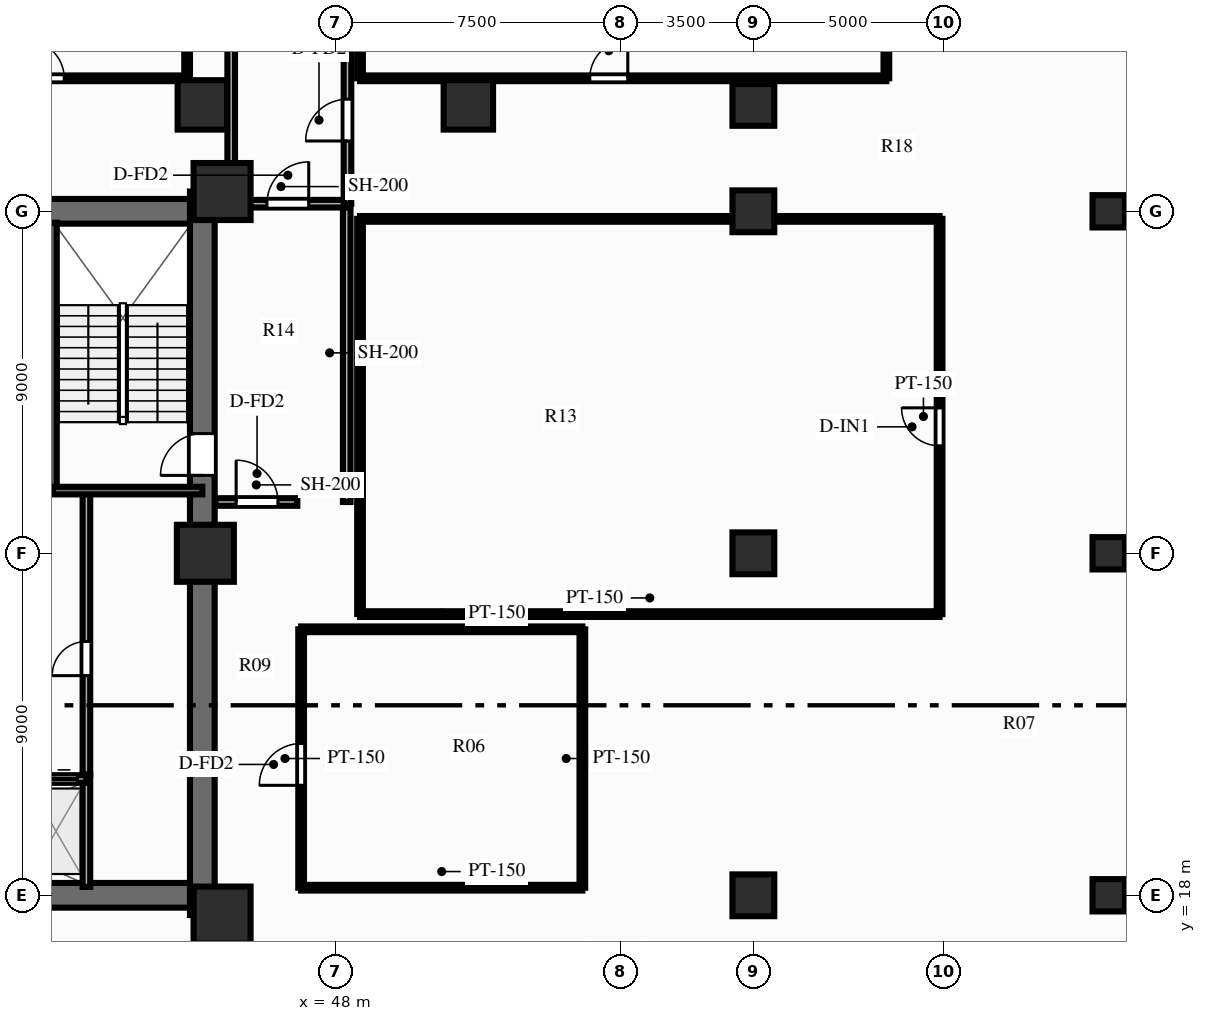
"""IFC4 building model, lengths in metres.
Left out: names, types, materials, properties, quantities, classifications, styles, units other than length and angle.
Written with IfcOpenShell. Run it as: python <this file> out.ifc"""

import sys

from ifc_helpers import new_model, si_unit, direction, frame, frame_2d, origin, origin_2d, place, context, subcontext, project, spatial, rectangle, circle, extrude, source, transform, mapped, element, fill, save


model = new_model("IFC4")
c1 = context("Model", 3, precision=1e-05, world=origin(), true_north=direction((0.0, 1.0)))
c2 = subcontext(c1, "Body", "Model", "MODEL_VIEW")
j1 = project(units=[si_unit("LENGTHUNIT", "METRE"), si_unit("PLANEANGLEUNIT", "RADIAN")], contexts=[c1])
p1 = place(None, origin())
s1 = spatial("IfcSite", under=j1, at=p1, CompositionType="ELEMENT")
p2 = place(p1, origin())
s2 = spatial("IfcBuilding", under=s1, at=p2, CompositionType="ELEMENT")
p3 = place(p2, origin())
s3 = spatial("IfcBuildingStorey", under=s2, at=p3, CompositionType="ELEMENT", Elevation=0.0)
p4 = place(p3, frame((44.5, 17.48, 0.0), z_axis=(0.0, 0.0, 1.0), x_axis=(0.0, 1.0, 0.0)))
e1 = element("IfcWall", 1, at=p4, inside=s3, PredefinedType="SHEAR", context=c2, shape_type="SweptSolid", body=[
    extrude(rectangle(XDim=19.04, YDim=0.65, at=frame_2d((9.52, 0.0))), origin(), (0.0, 0.0, 1.0), 4.2),
])
p5 = place(p4, frame((12.67, 0.0, 0.0), z_axis=(0.0, 0.0, 1.0), x_axis=(-1.0, 0.0, 0.0)))
e2 = element("IfcOpeningElement", 2, at=p5, cuts=e1, PredefinedType="OPENING", context=c2, shape_type="SweptSolid", body=[
    extrude(rectangle(XDim=1.1, YDim=2.15, at=frame_2d((0.55, 1.075))), frame((0.0, 0.337, 0.0), z_axis=(0.0, -1.0, 0.0), x_axis=(1.0, 0.0, 0.0)), (0.0, 0.0, 1.0), 0.674),
])
p6 = place(p3, frame((31.825, 18.0, 0.0), z_axis=(0.0, 0.0, 1.0), x_axis=(1.0, 0.0, 0.0)))
e3 = element("IfcWall", 3, at=p6, inside=s3, PredefinedType="SHEAR", context=c2, shape_type="SweptSolid", body=[
    extrude(rectangle(XDim=12.35, YDim=0.65, at=frame_2d((6.175, 0.0))), origin(), (0.0, 0.0, 1.0), 4.2),
])
p7 = place(p3, frame((31.825, 36.0, 0.0), z_axis=(0.0, 0.0, 1.0), x_axis=(1.0, 0.0, 0.0)))
e4 = element("IfcWall", 4, at=p7, inside=s3, PredefinedType="SHEAR", context=c2, shape_type="SweptSolid", body=[
    extrude(rectangle(XDim=12.35, YDim=0.65, at=frame_2d((6.175, 0.0))), origin(), (0.0, 0.0, 1.0), 4.2),
])
p8 = place(p7, frame((5.125, 0.0, 0.0), z_axis=(0.0, 0.0, 1.0), x_axis=(-1.0, 0.0, 0.0)))
e5 = element("IfcOpeningElement", 5, at=p8, cuts=e4, PredefinedType="OPENING", context=c2, shape_type="SweptSolid", body=[
    extrude(rectangle(XDim=1.4, YDim=2.15, at=frame_2d((0.7, 1.075))), frame((0.0, 0.337, 0.0), z_axis=(0.0, -1.0, 0.0), x_axis=(1.0, 0.0, 0.0)), (0.0, 0.0, 1.0), 0.674),
])
m1 = source(origin(), c2, "Body", "SweptSolid", [
    extrude(rectangle(XDim=1.5, YDim=1.5, at=origin_2d()), origin(), (0.0, 0.0, 1.0), 4.2),
])
for number, where, z_axis, x_axis in (
    (6, (45.02, 17.48, 0.0), (0.0, 0.0, 1.0), (1.0, 0.0, 0.0)),
    (7, (45.02, 36.52, 0.0), (0.0, 0.0, 1.0), (1.0, 0.0, 0.0)),
    (8, (44.58, 27.0, 0.0), (0.0, 0.0, 1.0), (1.0, 0.0, 0.0)),
):
    element("IfcColumn", number, at=place(p3, frame(where, z_axis=z_axis, x_axis=x_axis)), inside=s3, PredefinedType="COLUMN", context=c2, shape_type="MappedRepresentation", body=[
        mapped(m1, transform((0.0, 0.0, 0.0), scale=1.0)),
    ])
m2 = source(origin(), c2, "Body", "SweptSolid", [
    extrude(circle(Radius=0.425, at=origin_2d()), origin(), (0.0, 0.0, 1.0), 4.2),
])
for number, where, z_axis, x_axis in (
    (9, (68.35, 18.0, 0.0), (0.0, 0.0, 1.0), (1.0, 0.0, 0.0)),
    (10, (68.35, 27.0, 0.0), (0.0, 0.0, 1.0), (1.0, 0.0, 0.0)),
    (11, (68.35, 36.0, 0.0), (0.0, 0.0, 1.0), (1.0, 0.0, 0.0)),
):
    element("IfcColumn", number, at=place(p3, frame(where, z_axis=z_axis, x_axis=x_axis)), inside=s3, PredefinedType="COLUMN", context=c2, shape_type="MappedRepresentation", body=[
        mapped(m2, transform((0.0, 0.0, 0.0), scale=1.0)),
    ])
m3 = source(origin(), c2, "Body", "SweptSolid", [
    extrude(rectangle(XDim=1.1, YDim=1.1, at=origin_2d()), origin(), (0.0, 0.0, 1.0), 4.2),
])
for number, where, z_axis, x_axis in (
    (12, (59.0, 18.0, 0.0), (0.0, 0.0, 1.0), (1.0, 0.0, 0.0)),
    (13, (59.0, 27.0, 0.0), (0.0, 0.0, 1.0), (1.0, 0.0, 0.0)),
    (14, (59.0, 36.0, 0.0), (0.0, 0.0, 1.0), (1.0, 0.0, 0.0)),
    (15, (59.0, 38.8, 0.0), (0.0, 0.0, 1.0), (1.0, 0.0, 0.0)),
):
    element("IfcColumn", number, at=place(p3, frame(where, z_axis=z_axis, x_axis=x_axis)), inside=s3, PredefinedType="COLUMN", context=c2, shape_type="MappedRepresentation", body=[
        mapped(m3, transform((0.0, 0.0, 0.0), scale=1.0)),
    ])
m4 = source(origin(), c2, "Body", "SweptSolid", [
    extrude(rectangle(XDim=1.3, YDim=1.3, at=origin_2d()), origin(), (0.0, 0.0, 1.0), 4.2),
])
for number, where, z_axis, x_axis in (
    (16, (44.5, 38.8, 0.0), (0.0, 0.0, 1.0), (1.0, 0.0, 0.0)),
    (17, (51.5, 38.8, 0.0), (0.0, 0.0, 1.0), (1.0, 0.0, 0.0)),
):
    element("IfcColumn", number, at=place(p3, frame(where, z_axis=z_axis, x_axis=x_axis)), inside=s3, PredefinedType="COLUMN", context=c2, shape_type="MappedRepresentation", body=[
        mapped(m4, transform((0.0, 0.0, 0.0), scale=1.0)),
    ])
p9 = place(p3, frame((41.45, 18.22, 0.0), z_axis=(0.0, 0.0, 1.0), x_axis=(0.0, 1.0, 0.0)))
e18 = element("IfcWall", 18, at=p9, inside=s3, PredefinedType="PARTITIONING", context=c2, shape_type="SweptSolid", body=[
    extrude(rectangle(XDim=2.96, YDim=0.2, at=frame_2d((1.48, 0.0))), origin(), (0.0, 0.0, 1.0), 3.92),
])
p10 = place(p3, frame((41.45, 21.18, 0.0), z_axis=(0.0, 0.0, 1.0), x_axis=(0.0, 1.0, 0.0)))
e19 = element("IfcWall", 19, at=p10, inside=s3, PredefinedType="PARTITIONING", context=c2, shape_type="SweptSolid", body=[
    extrude(rectangle(XDim=7.42, YDim=0.2, at=frame_2d((3.71, 0.0))), origin(), (0.0, 0.0, 1.0), 3.92),
])
p11 = place(p10, frame((2.6, 0.0, 0.0)))
e20 = element("IfcOpeningElement", 20, at=p11, cuts=e19, PredefinedType="OPENING", context=c2, shape_type="SweptSolid", body=[
    extrude(rectangle(XDim=0.9, YDim=2.1, at=frame_2d((0.45, 1.05))), frame((0.0, 0.112, 0.0), z_axis=(0.0, -1.0, 0.0), x_axis=(1.0, 0.0, 0.0)), (0.0, 0.0, 1.0), 0.224),
])
p12 = place(p3, frame((35.43, 21.06, 0.0), z_axis=(0.0, 0.0, 1.0), x_axis=(1.0, 0.0, 0.0)))
e21 = element("IfcWall", 21, at=p12, inside=s3, PredefinedType="PARTITIONING", context=c2, shape_type="SweptSolid", body=[
    extrude(rectangle(XDim=6.02, YDim=0.2, at=frame_2d((3.01, 0.0))), origin(), (0.0, 0.0, 1.0), 3.92),
])
p13 = place(p12, frame((1.0, 0.0, 0.0)))
e22 = element("IfcOpeningElement", 22, at=p13, cuts=e21, PredefinedType="OPENING", context=c2, shape_type="SweptSolid", body=[
    extrude(rectangle(XDim=1.1, YDim=2.15, at=frame_2d((0.55, 1.075))), frame((0.0, 0.112, 0.0), z_axis=(0.0, -1.0, 0.0), x_axis=(1.0, 0.0, 0.0)), (0.0, 0.0, 1.0), 0.224),
])
p14 = place(p12, frame((2.95, 0.0, 0.0)))
e23 = element("IfcOpeningElement", 23, at=p14, cuts=e21, PredefinedType="OPENING", context=c2, shape_type="SweptSolid", body=[
    extrude(rectangle(XDim=1.1, YDim=2.15, at=frame_2d((0.55, 1.075))), frame((0.0, 0.112, 0.0), z_axis=(0.0, -1.0, 0.0), x_axis=(1.0, 0.0, 0.0)), (0.0, 0.0, 1.0), 0.224),
])
p15 = place(p12, frame((4.58, 0.0, 0.0)))
e24 = element("IfcOpeningElement", 24, at=p15, cuts=e21, PredefinedType="OPENING", context=c2, shape_type="SweptSolid", body=[
    extrude(rectangle(XDim=1.2, YDim=2.15, at=frame_2d((0.6, 1.075))), frame((0.0, 0.112, 0.0), z_axis=(0.0, -1.0, 0.0), x_axis=(1.0, 0.0, 0.0)), (0.0, 0.0, 1.0), 0.224),
])
p16 = place(p3, frame((40.57, 28.65, 0.0), z_axis=(0.0, 0.0, 1.0), x_axis=(0.0, 1.0, 0.0)))
e25 = element("IfcWall", 25, at=p16, inside=s3, PredefinedType="SOLIDWALL", context=c2, shape_type="SweptSolid", body=[
    extrude(rectangle(XDim=7.05, YDim=0.2, at=frame_2d((3.525, 0.0))), origin(), (0.0, 0.0, 1.0), 3.92),
])
p17 = place(p3, frame((40.57, 28.65, 0.0), z_axis=(0.0, 0.0, 1.0), x_axis=(1.0, 0.0, 0.0)))
e26 = element("IfcWall", 26, at=p17, inside=s3, PredefinedType="SOLIDWALL", context=c2, shape_type="SweptSolid", body=[
    extrude(rectangle(XDim=3.93, YDim=0.2, at=frame_2d((1.965, 0.0))), origin(), (0.0, 0.0, 1.0), 3.92),
])
p18 = place(p3, frame((44.84, 28.35, 0.0), z_axis=(0.0, 0.0, 1.0), x_axis=(1.0, 0.0, 0.0)))
e27 = element("IfcWall", 27, at=p18, inside=s3, PredefinedType="PARTITIONING", context=c2, shape_type="SweptSolid", body=[
    extrude(rectangle(XDim=2.16, YDim=0.2, at=frame_2d((1.08, 0.0))), origin(), (0.0, 0.0, 1.0), 3.92),
])
p19 = place(p18, frame((0.55, 0.0, 0.0)))
e28 = element("IfcOpeningElement", 28, at=p19, cuts=e27, PredefinedType="OPENING", context=c2, shape_type="SweptSolid", body=[
    extrude(rectangle(XDim=1.1, YDim=2.15, at=frame_2d((0.55, 1.075))), frame((0.0, 0.112, 0.0), z_axis=(0.0, -1.0, 0.0), x_axis=(1.0, 0.0, 0.0)), (0.0, 0.0, 1.0), 0.224),
])
p20 = place(p3, frame((48.3, 28.35, 0.0), z_axis=(0.0, 0.0, 1.0), x_axis=(0.0, 1.0, 0.0)))
e29 = element("IfcWall", 29, at=p20, inside=s3, PredefinedType="PARTITIONING", context=c2, shape_type="SweptSolid", body=[
    extrude(rectangle(XDim=7.85, YDim=0.2, at=frame_2d((3.925, 0.0))), origin(), (0.0, 0.0, 1.0), 3.92),
])
p21 = place(p3, frame((44.84, 36.2, 0.0), z_axis=(0.0, 0.0, 1.0), x_axis=(1.0, 0.0, 0.0)))
e30 = element("IfcWall", 30, at=p21, inside=s3, PredefinedType="PARTITIONING", context=c2, shape_type="SweptSolid", body=[
    extrude(rectangle(XDim=3.46, YDim=0.2, at=frame_2d((1.73, 0.0))), origin(), (0.0, 0.0, 1.0), 3.29),
])
p22 = place(p21, frame((1.36, 0.0, 0.0)))
e31 = element("IfcOpeningElement", 31, at=p22, cuts=e30, PredefinedType="OPENING", context=c2, shape_type="SweptSolid", body=[
    extrude(rectangle(XDim=1.1, YDim=2.15, at=frame_2d((0.55, 1.075))), frame((0.0, 0.112, 0.0), z_axis=(0.0, -1.0, 0.0), x_axis=(1.0, 0.0, 0.0)), (0.0, 0.0, 1.0), 0.224),
])
p23 = place(p3, frame((45.26, 36.2, 0.0), z_axis=(0.0, 0.0, 1.0), x_axis=(0.0, 1.0, 0.0)))
e32 = element("IfcWall", 32, at=p23, inside=s3, PredefinedType="PARTITIONING", context=c2, shape_type="SweptSolid", body=[
    extrude(rectangle(XDim=17.65, YDim=0.2, at=frame_2d((8.825, 0.0))), origin(), (0.0, 0.0, 1.0), 3.44),
])
p24 = place(p3, frame((48.32, 36.2, 0.0), z_axis=(0.0, 0.0, 1.0), x_axis=(0.0, 1.0, 0.0)))
e33 = element("IfcWall", 33, at=p24, inside=s3, PredefinedType="PARTITIONING", context=c2, shape_type="SweptSolid", body=[
    extrude(rectangle(XDim=17.65, YDim=0.2, at=frame_2d((8.825, 0.0))), origin(), (0.0, 0.0, 1.0), 3.92),
])
p25 = place(p24, frame((1.65, 0.0, 0.0)))
e34 = element("IfcOpeningElement", 34, at=p25, cuts=e33, PredefinedType="OPENING", context=c2, shape_type="SweptSolid", body=[
    extrude(rectangle(XDim=1.1, YDim=2.15, at=frame_2d((0.55, 1.075))), frame((0.0, 0.112, 0.0), z_axis=(0.0, -1.0, 0.0), x_axis=(1.0, 0.0, 0.0)), (0.0, 0.0, 1.0), 0.224),
])
for number, where, z_axis, x_axis in (
    (35, (47.1, 18.2, 0.0), (0.0, 0.0, 1.0), (1.0, 0.0, 0.0)),
    (36, (47.1, 25.0, 0.0), (0.0, 0.0, 1.0), (1.0, 0.0, 0.0)),
):
    element("IfcWall", number, at=place(p3, frame(where, z_axis=z_axis, x_axis=x_axis)), inside=s3, PredefinedType="PARTITIONING", context=c2, shape_type="SweptSolid", body=[
        extrude(rectangle(XDim=7.4, YDim=0.15, at=frame_2d((3.7, 0.0))), origin(), (0.0, 0.0, 1.0), 3.92),
    ])
p26 = place(p3, frame((47.1, 18.2, 0.0), z_axis=(0.0, 0.0, 1.0), x_axis=(0.0, 1.0, 0.0)))
e37 = element("IfcWall", 37, at=p26, inside=s3, PredefinedType="PARTITIONING", context=c2, shape_type="SweptSolid", body=[
    extrude(rectangle(XDim=6.8, YDim=0.15, at=frame_2d((3.4, 0.0))), origin(), (0.0, 0.0, 1.0), 3.92),
])
p27 = place(p26, frame((2.694, 0.0, 0.0)))
e38 = element("IfcOpeningElement", 38, at=p27, cuts=e37, PredefinedType="OPENING", context=c2, shape_type="SweptSolid", body=[
    extrude(rectangle(XDim=1.1, YDim=2.15, at=frame_2d((0.55, 1.075))), frame((0.0, 0.087, 0.0), z_axis=(0.0, -1.0, 0.0), x_axis=(1.0, 0.0, 0.0)), (0.0, 0.0, 1.0), 0.174),
])
p28 = place(p3, frame((54.5, 18.2, 0.0), z_axis=(0.0, 0.0, 1.0), x_axis=(0.0, 1.0, 0.0)))
e39 = element("IfcWall", 39, at=p28, inside=s3, PredefinedType="PARTITIONING", context=c2, shape_type="SweptSolid", body=[
    extrude(rectangle(XDim=6.8, YDim=0.15, at=frame_2d((3.4, 0.0))), origin(), (0.0, 0.0, 1.0), 3.92),
])
p29 = place(p3, frame((35.3, 39.5, 0.0), z_axis=(0.0, 0.0, 1.0), x_axis=(1.0, 0.0, 0.0)))
e40 = element("IfcWall", 40, at=p29, inside=s3, PredefinedType="PARTITIONING", context=c2, shape_type="SweptSolid", body=[
    extrude(rectangle(XDim=8.8, YDim=0.15, at=frame_2d((4.4, 0.0))), origin(), (0.0, 0.0, 1.0), 3.92),
])
p30 = place(p29, frame((4.566, 0.0, 0.0)))
e41 = element("IfcOpeningElement", 41, at=p30, cuts=e40, PredefinedType="OPENING", context=c2, shape_type="SweptSolid", body=[
    extrude(rectangle(XDim=1.0, YDim=2.1, at=frame_2d((0.5, 1.05))), frame((0.0, 0.087, 0.0), z_axis=(0.0, -1.0, 0.0), x_axis=(1.0, 0.0, 0.0)), (0.0, 0.0, 1.0), 0.174),
])
p31 = place(p3, frame((44.1, 39.5, 0.0), z_axis=(0.0, 0.0, 1.0), x_axis=(0.0, 1.0, 0.0)))
e42 = element("IfcWall", 42, at=p31, inside=s3, PredefinedType="PARTITIONING", context=c2, shape_type="SweptSolid", body=[
    extrude(rectangle(XDim=14.4, YDim=0.15, at=frame_2d((7.2, 0.0))), origin(), (0.0, 0.0, 1.0), 3.92),
])
p32 = place(p3, frame((48.65, 39.5, 0.0), z_axis=(0.0, 0.0, 1.0), x_axis=(1.0, 0.0, 0.0)))
e43 = element("IfcWall", 43, at=p32, inside=s3, PredefinedType="PARTITIONING", context=c2, shape_type="SweptSolid", body=[
    extrude(rectangle(XDim=13.85, YDim=0.15, at=frame_2d((6.925, 0.0))), origin(), (0.0, 0.0, 1.0), 3.92),
])
p33 = place(p32, frame((6.045, 0.0, 0.0)))
e44 = element("IfcOpeningElement", 44, at=p33, cuts=e43, PredefinedType="OPENING", context=c2, shape_type="SweptSolid", body=[
    extrude(rectangle(XDim=1.0, YDim=2.1, at=frame_2d((0.5, 1.05))), frame((0.0, 0.087, 0.0), z_axis=(0.0, -1.0, 0.0), x_axis=(1.0, 0.0, 0.0)), (0.0, 0.0, 1.0), 0.174),
])
for number, where, z_axis, x_axis in (
    (45, (48.65, 39.5, 0.0), (0.0, 0.0, 1.0), (0.0, 1.0, 0.0)),
    (46, (62.5, 39.5, 0.0), (0.0, 0.0, 1.0), (0.0, 1.0, 0.0)),
):
    element("IfcWall", number, at=place(p3, frame(where, z_axis=z_axis, x_axis=x_axis)), inside=s3, PredefinedType="PARTITIONING", context=c2, shape_type="SweptSolid", body=[
        extrude(rectangle(XDim=14.4, YDim=0.15, at=frame_2d((7.2, 0.0))), origin(), (0.0, 0.0, 1.0), 3.92),
    ])
for number, where, z_axis, x_axis in (
    (47, (48.65, 25.4, 0.0), (0.0, 0.0, 1.0), (1.0, 0.0, 0.0)),
    (48, (48.65, 35.8, 0.0), (0.0, 0.0, 1.0), (1.0, 0.0, 0.0)),
):
    element("IfcWall", number, at=place(p3, frame(where, z_axis=z_axis, x_axis=x_axis)), inside=s3, PredefinedType="PARTITIONING", context=c2, shape_type="SweptSolid", body=[
        extrude(rectangle(XDim=15.25, YDim=0.15, at=frame_2d((7.625, 0.0))), origin(), (0.0, 0.0, 1.0), 3.92),
    ])
p34 = place(p3, frame((48.65, 25.4, 0.0), z_axis=(0.0, 0.0, 1.0), x_axis=(0.0, 1.0, 0.0)))
e49 = element("IfcWall", 49, at=p34, inside=s3, PredefinedType="PARTITIONING", context=c2, shape_type="SweptSolid", body=[
    extrude(rectangle(XDim=10.4, YDim=0.15, at=frame_2d((5.2, 0.0))), origin(), (0.0, 0.0, 1.0), 3.92),
])
p35 = place(p3, frame((63.9, 25.4, 0.0), z_axis=(0.0, 0.0, 1.0), x_axis=(0.0, 1.0, 0.0)))
e50 = element("IfcWall", 50, at=p35, inside=s3, PredefinedType="PARTITIONING", context=c2, shape_type="SweptSolid", body=[
    extrude(rectangle(XDim=10.4, YDim=0.15, at=frame_2d((5.2, 0.0))), origin(), (0.0, 0.0, 1.0), 3.92),
])
p36 = place(p35, frame((4.428, 0.0, 0.0)))
e51 = element("IfcOpeningElement", 51, at=p36, cuts=e50, PredefinedType="OPENING", context=c2, shape_type="SweptSolid", body=[
    extrude(rectangle(XDim=1.0, YDim=2.1, at=frame_2d((0.5, 1.05))), frame((0.0, 0.087, 0.0), z_axis=(0.0, -1.0, 0.0), x_axis=(1.0, 0.0, 0.0)), (0.0, 0.0, 1.0), 0.174),
])
m5 = source(origin(), c2, "Body", "SweptSolid", [
    extrude(rectangle(XDim=1.1, YDim=2.15, at=frame_2d((0.55, 1.075))), frame((0.0, 0.025, 0.0), z_axis=(0.0, -1.0, 0.0), x_axis=(1.0, 0.0, 0.0)), (0.0, 0.0, 1.0), 0.05),
])
p37 = place(p5, origin())
e52 = element("IfcDoor", 52, at=p37, inside=s3, OperationType="SINGLE_SWING_RIGHT", PredefinedType="DOOR", context=c2, shape_type="MappedRepresentation", body=[
    mapped(m5, transform((0.0, 0.0, 0.0), scale=1.0)),
])
fill(e2, e52)
m6 = source(origin(), c2, "Body", "SweptSolid", [
    extrude(rectangle(XDim=0.9, YDim=2.1, at=frame_2d((0.45, 1.05))), frame((0.0, 0.025, 0.0), z_axis=(0.0, -1.0, 0.0), x_axis=(1.0, 0.0, 0.0)), (0.0, 0.0, 1.0), 0.05),
])
p38 = place(p11, origin())
e53 = element("IfcDoor", 53, at=p38, inside=s3, OperationType="SINGLE_SWING_LEFT", PredefinedType="DOOR", context=c2, shape_type="MappedRepresentation", body=[
    mapped(m6, transform((0.0, 0.0, 0.0), scale=1.0)),
])
fill(e20, e53)
m7 = source(origin(), c2, "Body", "SweptSolid", [
    extrude(rectangle(XDim=1.2, YDim=2.15, at=frame_2d((0.6, 1.075))), frame((0.0, 0.025, 0.0), z_axis=(0.0, -1.0, 0.0), x_axis=(1.0, 0.0, 0.0)), (0.0, 0.0, 1.0), 0.05),
])
p39 = place(p15, origin())
e54 = element("IfcDoor", 54, at=p39, inside=s3, OperationType="DOUBLE_DOOR_SLIDING", PredefinedType="DOOR", context=c2, shape_type="MappedRepresentation", body=[
    mapped(m7, transform((0.0, 0.0, 0.0), scale=1.0)),
])
fill(e24, e54)
p40 = place(p19, origin())
e55 = element("IfcDoor", 55, at=p40, inside=s3, OperationType="SINGLE_SWING_LEFT", PredefinedType="DOOR", context=c2, shape_type="MappedRepresentation", body=[
    mapped(m5, transform((0.0, 0.0, 0.0), scale=1.0)),
])
fill(e28, e55)
p41 = place(p22, origin())
e56 = element("IfcDoor", 56, at=p41, inside=s3, OperationType="SINGLE_SWING_RIGHT", PredefinedType="DOOR", context=c2, shape_type="MappedRepresentation", body=[
    mapped(m5, transform((0.0, 0.0, 0.0), scale=1.0)),
])
fill(e31, e56)
p42 = place(p25, origin())
e57 = element("IfcDoor", 57, at=p42, inside=s3, OperationType="SINGLE_SWING_LEFT", PredefinedType="DOOR", context=c2, shape_type="MappedRepresentation", body=[
    mapped(m5, transform((0.0, 0.0, 0.0), scale=1.0)),
])
fill(e34, e57)
p43 = place(p27, origin())
e58 = element("IfcDoor", 58, at=p43, inside=s3, OperationType="SINGLE_SWING_LEFT", PredefinedType="DOOR", context=c2, shape_type="MappedRepresentation", body=[
    mapped(m5, transform((0.0, 0.0, 0.0), scale=1.0)),
])
fill(e38, e58)
m8 = source(origin(), c2, "Body", "SweptSolid", [
    extrude(rectangle(XDim=1.0, YDim=2.1, at=frame_2d((0.5, 1.05))), frame((0.0, 0.025, 0.0), z_axis=(0.0, -1.0, 0.0), x_axis=(1.0, 0.0, 0.0)), (0.0, 0.0, 1.0), 0.05),
])
p44 = place(p30, origin())
e59 = element("IfcDoor", 59, at=p44, inside=s3, OperationType="SINGLE_SWING_LEFT", PredefinedType="DOOR", context=c2, shape_type="MappedRepresentation", body=[
    mapped(m8, transform((0.0, 0.0, 0.0), scale=1.0)),
])
fill(e41, e59)
p45 = place(p33, origin())
e60 = element("IfcDoor", 60, at=p45, inside=s3, OperationType="SINGLE_SWING_RIGHT", PredefinedType="DOOR", context=c2, shape_type="MappedRepresentation", body=[
    mapped(m8, transform((0.0, 0.0, 0.0), scale=1.0)),
])
fill(e44, e60)
p46 = place(p36, origin())
e61 = element("IfcDoor", 61, at=p46, inside=s3, OperationType="SINGLE_SWING_RIGHT", PredefinedType="DOOR", context=c2, shape_type="MappedRepresentation", body=[
    mapped(m8, transform((0.0, 0.0, 0.0), scale=1.0)),
])
fill(e51, e61)
save(model, sys.argv[1])
